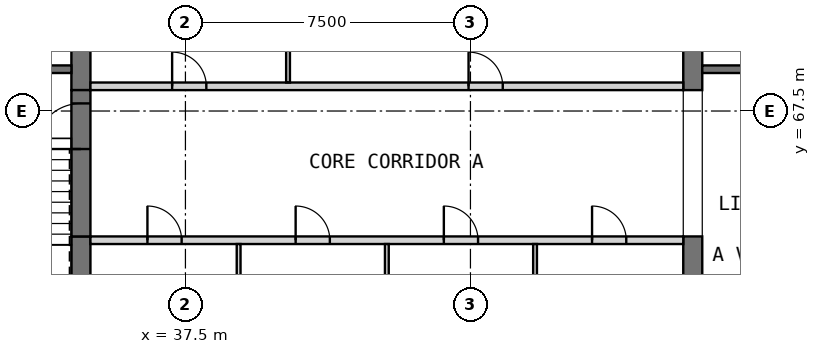
"""IFC4 building model, lengths in metres.
Left out: names, types, materials, properties, quantities, classifications, styles, units other than length and angle.
Written with IfcOpenShell. Run it as: python <this file> out.ifc"""

import sys

from ifc_helpers import new_model, si_unit, direction, frame, frame_2d, origin, place, context, subcontext, project, spatial, rectangle, extrude, element, fill, save


model = new_model("IFC4")
c1 = context("Model", 3, precision=1e-05, world=origin(), true_north=direction((0.0, 1.0)))
c2 = subcontext(c1, "Body", "Model", "MODEL_VIEW")
j1 = project(units=[si_unit("LENGTHUNIT", "METRE"), si_unit("PLANEANGLEUNIT", "RADIAN")], contexts=[c1])
p1 = place(None, origin())
s1 = spatial("IfcSite", under=j1, at=p1, CompositionType="ELEMENT")
p2 = place(p1, origin())
s2 = spatial("IfcBuilding", under=s1, at=p2, CompositionType="ELEMENT")
p3 = place(p2, frame((0.0, 0.0, 186.2)))
s3 = spatial("IfcBuildingStorey", under=s2, at=p3, CompositionType="ELEMENT", Elevation=186.2)
p4 = place(p3, frame((34.75, 60.8, 0.0), z_axis=(0.0, 0.0, 1.0), x_axis=(0.0, 1.0, 0.0)))
e1 = element("IfcWall", 1, at=p4, inside=s3, PredefinedType="SHEAR", context=c2, shape_type="SweptSolid", body=[
    extrude(rectangle(XDim=3.4, YDim=0.5, at=frame_2d((1.7, 0.0))), origin(), (0.0, 0.0, 1.0), 3.5),
])
p5 = place(p3, frame((34.75, 68.05, 0.0), z_axis=(0.0, 0.0, 1.0), x_axis=(0.0, 1.0, 0.0)))
e2 = element("IfcWall", 2, at=p5, inside=s3, PredefinedType="SHEAR", context=c2, shape_type="SweptSolid", body=[
    extrude(rectangle(XDim=6.4, YDim=0.5, at=frame_2d((3.2, 0.0))), origin(), (0.0, 0.0, 1.0), 3.5),
])
p6 = place(p3, frame((50.85, 60.8, 0.0), z_axis=(0.0, 0.0, 1.0), x_axis=(0.0, 1.0, 0.0)))
e3 = element("IfcWall", 3, at=p6, inside=s3, PredefinedType="SHEAR", context=c2, shape_type="SweptSolid", body=[
    extrude(rectangle(XDim=3.4, YDim=0.5, at=frame_2d((1.7, 0.0))), origin(), (0.0, 0.0, 1.0), 3.5),
])
p7 = place(p3, frame((50.85, 68.05, 0.0), z_axis=(0.0, 0.0, 1.0), x_axis=(0.0, 1.0, 0.0)))
e4 = element("IfcWall", 4, at=p7, inside=s3, PredefinedType="SHEAR", context=c2, shape_type="SweptSolid", body=[
    extrude(rectangle(XDim=6.4, YDim=0.5, at=frame_2d((3.2, 0.0))), origin(), (0.0, 0.0, 1.0), 3.5),
])
p8 = place(p3, frame((35.0, 64.1, 0.0), z_axis=(0.0, 0.0, 1.0), x_axis=(1.0, 0.0, 0.0)))
e5 = element("IfcWall", 5, at=p8, inside=s3, PredefinedType="PARTITIONING", context=c2, shape_type="SweptSolid", body=[
    extrude(rectangle(XDim=15.6, YDim=0.2, at=frame_2d((7.8, 0.0))), origin(), (0.0, 0.0, 1.0), 3.25),
])
p9 = place(p8, frame((1.5, 0.0, 0.0)))
e6 = element("IfcOpeningElement", 6, at=p9, cuts=e5, PredefinedType="OPENING", context=c2, shape_type="SweptSolid", body=[
    extrude(rectangle(XDim=0.9, YDim=2.1, at=frame_2d((0.45, 1.05))), frame((0.0, 0.11, 0.0), z_axis=(0.0, -1.0, 0.0), x_axis=(1.0, 0.0, 0.0)), (0.0, 0.0, 1.0), 0.22),
])
p10 = place(p8, frame((5.4, 0.0, 0.0)))
e7 = element("IfcOpeningElement", 7, at=p10, cuts=e5, PredefinedType="OPENING", context=c2, shape_type="SweptSolid", body=[
    extrude(rectangle(XDim=0.9, YDim=2.1, at=frame_2d((0.45, 1.05))), frame((0.0, 0.11, 0.0), z_axis=(0.0, -1.0, 0.0), x_axis=(1.0, 0.0, 0.0)), (0.0, 0.0, 1.0), 0.22),
])
p11 = place(p8, frame((9.3, 0.0, 0.0)))
e8 = element("IfcOpeningElement", 8, at=p11, cuts=e5, PredefinedType="OPENING", context=c2, shape_type="SweptSolid", body=[
    extrude(rectangle(XDim=0.9, YDim=2.1, at=frame_2d((0.45, 1.05))), frame((0.0, 0.11, 0.0), z_axis=(0.0, -1.0, 0.0), x_axis=(1.0, 0.0, 0.0)), (0.0, 0.0, 1.0), 0.22),
])
p12 = place(p8, frame((13.2, 0.0, 0.0)))
e9 = element("IfcOpeningElement", 9, at=p12, cuts=e5, PredefinedType="OPENING", context=c2, shape_type="SweptSolid", body=[
    extrude(rectangle(XDim=0.9, YDim=2.1, at=frame_2d((0.45, 1.05))), frame((0.0, 0.11, 0.0), z_axis=(0.0, -1.0, 0.0), x_axis=(1.0, 0.0, 0.0)), (0.0, 0.0, 1.0), 0.22),
])
for number, where, z_axis, x_axis in (
    (10, (38.9, 60.8, 0.0), (0.0, 0.0, 1.0), (0.0, 1.0, 0.0)),
    (11, (42.8, 60.8, 0.0), (0.0, 0.0, 1.0), (0.0, 1.0, 0.0)),
    (12, (46.7, 60.8, 0.0), (0.0, 0.0, 1.0), (0.0, 1.0, 0.0)),
):
    element("IfcWall", number, at=place(p3, frame(where, z_axis=z_axis, x_axis=x_axis)), inside=s3, PredefinedType="PARTITIONING", context=c2, shape_type="SweptSolid", body=[
        extrude(rectangle(XDim=3.2, YDim=0.1, at=frame_2d((1.6, 0.0))), origin(), (0.0, 0.0, 1.0), 3.25),
    ])
p13 = place(p3, frame((35.0, 68.15, 0.0), z_axis=(0.0, 0.0, 1.0), x_axis=(1.0, 0.0, 0.0)))
e13 = element("IfcWall", 13, at=p13, inside=s3, PredefinedType="PARTITIONING", context=c2, shape_type="SweptSolid", body=[
    extrude(rectangle(XDim=15.6, YDim=0.2, at=frame_2d((7.8, 0.0))), origin(), (0.0, 0.0, 1.0), 3.25),
])
p14 = place(p13, frame((2.15, 0.0, 0.0)))
e14 = element("IfcOpeningElement", 14, at=p14, cuts=e13, PredefinedType="OPENING", context=c2, shape_type="SweptSolid", body=[
    extrude(rectangle(XDim=0.9, YDim=2.1, at=frame_2d((0.45, 1.05))), frame((0.0, 0.11, 0.0), z_axis=(0.0, -1.0, 0.0), x_axis=(1.0, 0.0, 0.0)), (0.0, 0.0, 1.0), 0.22),
])
p15 = place(p13, frame((9.95, 0.0, 0.0)))
e15 = element("IfcOpeningElement", 15, at=p15, cuts=e13, PredefinedType="OPENING", context=c2, shape_type="SweptSolid", body=[
    extrude(rectangle(XDim=0.9, YDim=2.1, at=frame_2d((0.45, 1.05))), frame((0.0, 0.11, 0.0), z_axis=(0.0, -1.0, 0.0), x_axis=(1.0, 0.0, 0.0)), (0.0, 0.0, 1.0), 0.22),
])
p16 = place(p3, frame((40.2, 68.25, 0.0), z_axis=(0.0, 0.0, 1.0), x_axis=(0.0, 1.0, 0.0)))
e16 = element("IfcWall", 16, at=p16, inside=s3, PredefinedType="PARTITIONING", context=c2, shape_type="SweptSolid", body=[
    extrude(rectangle(XDim=2.75, YDim=0.1, at=frame_2d((1.375, 0.0))), origin(), (0.0, 0.0, 1.0), 3.25),
])
p17 = place(p3, frame((34.75, 64.2, 0.0), z_axis=(0.0, 0.0, 1.0), x_axis=(0.0, 1.0, 0.0)))
e17 = element("IfcWall", 17, at=p17, inside=s3, PredefinedType="SOLIDWALL", context=c2, shape_type="SweptSolid", body=[
    extrude(rectangle(XDim=3.85, YDim=0.5, at=frame_2d((1.925, 0.0))), origin(), (0.0, 0.0, 1.0), 2.3),
])
p18 = place(p17, frame((2.3, 0.0, 0.0)))
e18 = element("IfcOpeningElement", 18, at=p18, cuts=e17, PredefinedType="OPENING", context=c2, shape_type="SweptSolid", body=[
    extrude(rectangle(XDim=1.2, YDim=2.1, at=frame_2d((0.6, 1.05))), frame((0.0, 0.26, 0.0), z_axis=(0.0, -1.0, 0.0), x_axis=(1.0, 0.0, 0.0)), (0.0, 0.0, 1.0), 0.52),
])
p19 = place(p3, frame((30.8, 68.6, 0.0), z_axis=(0.0, 0.0, 1.0), x_axis=(1.0, 0.0, 0.0)))
e19 = element("IfcWall", 19, at=p19, inside=s3, PredefinedType="SOLIDWALL", context=c2, shape_type="SweptSolid", body=[
    extrude(rectangle(XDim=3.7, YDim=0.2, at=frame_2d((1.85, 0.0))), origin(), (0.0, 0.0, 1.0), 3.25),
])
p20 = place(p19, frame((1.5, 0.0, 0.0)))
e20 = element("IfcOpeningElement", 20, at=p20, cuts=e19, PredefinedType="OPENING", context=c2, shape_type="SweptSolid", body=[
    extrude(rectangle(XDim=0.9, YDim=2.1, at=frame_2d((0.45, 1.05))), frame((0.0, 0.11, 0.0), z_axis=(0.0, -1.0, 0.0), x_axis=(1.0, 0.0, 0.0)), (0.0, 0.0, 1.0), 0.22),
])
p21 = place(p3, frame((51.1, 68.6, 0.0), z_axis=(0.0, 0.0, 1.0), x_axis=(1.0, 0.0, 0.0)))
e21 = element("IfcWall", 21, at=p21, inside=s3, PredefinedType="SOLIDWALL", context=c2, shape_type="SweptSolid", body=[
    extrude(rectangle(XDim=8.1, YDim=0.2, at=frame_2d((4.05, 0.0))), origin(), (0.0, 0.0, 1.0), 3.25),
])
p22 = place(p9, origin())
e22 = element("IfcDoor", 22, at=p22, inside=s3, OperationType="SINGLE_SWING_LEFT", PredefinedType="DOOR", context=c2, shape_type="SweptSolid", body=[
    extrude(rectangle(XDim=0.9, YDim=2.1, at=frame_2d((0.45, 1.05))), frame((0.0, 0.025, 0.0), z_axis=(0.0, -1.0, 0.0), x_axis=(1.0, 0.0, 0.0)), (0.0, 0.0, 1.0), 0.05),
])
fill(e6, e22)
p23 = place(p10, origin())
e23 = element("IfcDoor", 23, at=p23, inside=s3, OperationType="SINGLE_SWING_RIGHT", PredefinedType="DOOR", context=c2, shape_type="SweptSolid", body=[
    extrude(rectangle(XDim=0.9, YDim=2.1, at=frame_2d((0.45, 1.05))), frame((0.0, 0.025, 0.0), z_axis=(0.0, -1.0, 0.0), x_axis=(1.0, 0.0, 0.0)), (0.0, 0.0, 1.0), 0.05),
])
fill(e7, e23)
p24 = place(p11, origin())
e24 = element("IfcDoor", 24, at=p24, inside=s3, OperationType="SINGLE_SWING_LEFT", PredefinedType="DOOR", context=c2, shape_type="SweptSolid", body=[
    extrude(rectangle(XDim=0.9, YDim=2.1, at=frame_2d((0.45, 1.05))), frame((0.0, 0.025, 0.0), z_axis=(0.0, -1.0, 0.0), x_axis=(1.0, 0.0, 0.0)), (0.0, 0.0, 1.0), 0.05),
])
fill(e8, e24)
p25 = place(p12, origin())
e25 = element("IfcDoor", 25, at=p25, inside=s3, OperationType="SINGLE_SWING_RIGHT", PredefinedType="DOOR", context=c2, shape_type="SweptSolid", body=[
    extrude(rectangle(XDim=0.9, YDim=2.1, at=frame_2d((0.45, 1.05))), frame((0.0, 0.025, 0.0), z_axis=(0.0, -1.0, 0.0), x_axis=(1.0, 0.0, 0.0)), (0.0, 0.0, 1.0), 0.05),
])
fill(e9, e25)
p26 = place(p14, origin())
e26 = element("IfcDoor", 26, at=p26, inside=s3, OperationType="SINGLE_SWING_LEFT", PredefinedType="DOOR", context=c2, shape_type="SweptSolid", body=[
    extrude(rectangle(XDim=0.9, YDim=2.1, at=frame_2d((0.45, 1.05))), frame((0.0, 0.025, 0.0), z_axis=(0.0, -1.0, 0.0), x_axis=(1.0, 0.0, 0.0)), (0.0, 0.0, 1.0), 0.05),
])
fill(e14, e26)
p27 = place(p15, origin())
e27 = element("IfcDoor", 27, at=p27, inside=s3, OperationType="SINGLE_SWING_RIGHT", PredefinedType="DOOR", context=c2, shape_type="SweptSolid", body=[
    extrude(rectangle(XDim=0.9, YDim=2.1, at=frame_2d((0.45, 1.05))), frame((0.0, 0.025, 0.0), z_axis=(0.0, -1.0, 0.0), x_axis=(1.0, 0.0, 0.0)), (0.0, 0.0, 1.0), 0.05),
])
fill(e15, e27)
p28 = place(p18, origin())
e28 = element("IfcDoor", 28, at=p28, inside=s3, OperationType="SINGLE_SWING_LEFT", PredefinedType="DOOR", context=c2, shape_type="SweptSolid", body=[
    extrude(rectangle(XDim=1.2, YDim=2.1, at=frame_2d((0.6, 1.05))), frame((0.0, 0.025, 0.0), z_axis=(0.0, -1.0, 0.0), x_axis=(1.0, 0.0, 0.0)), (0.0, 0.0, 1.0), 0.05),
])
fill(e18, e28)
save(model, sys.argv[1])
